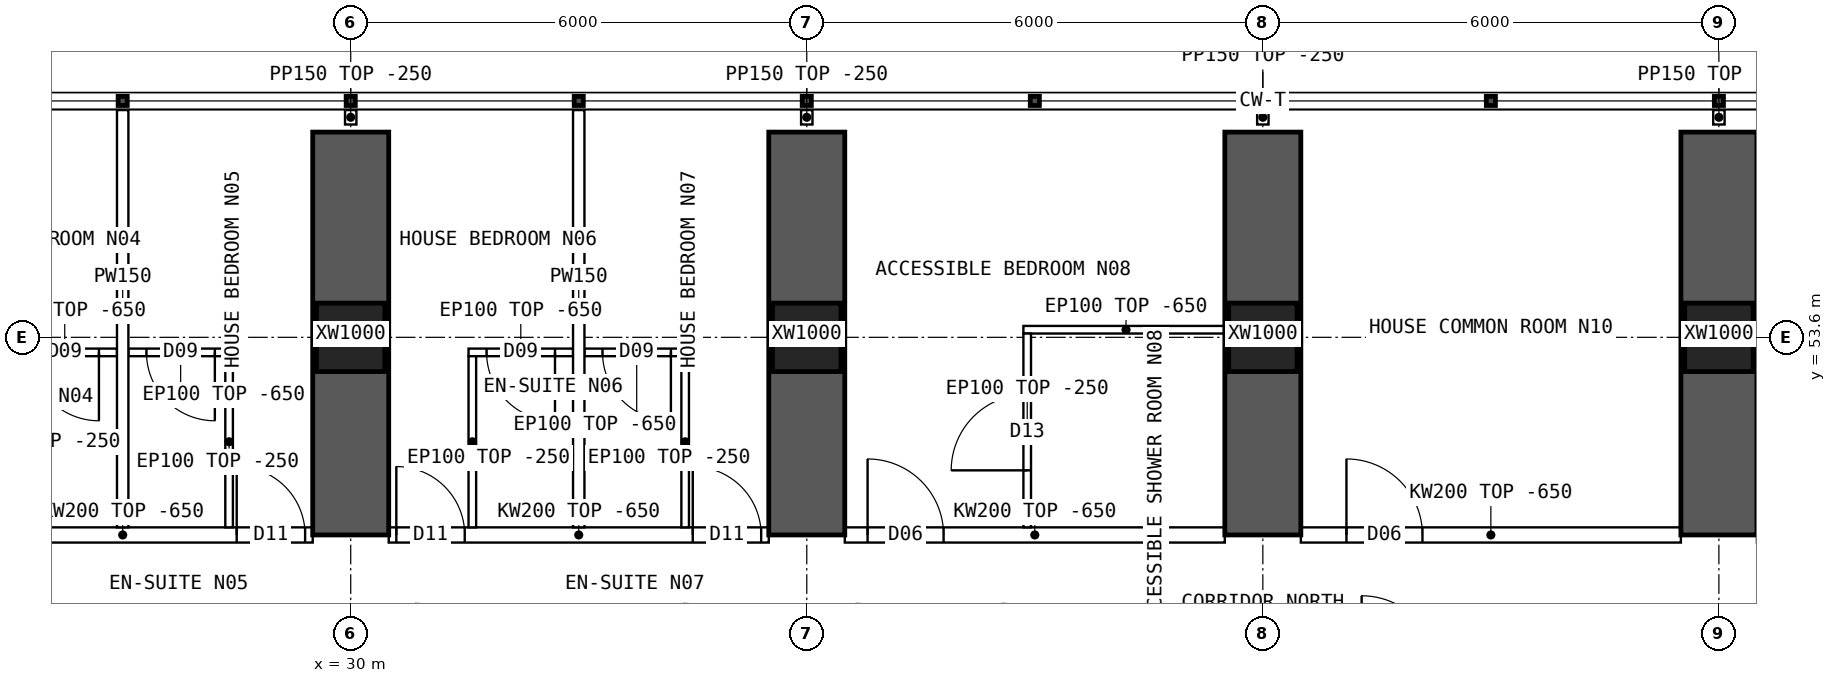
"""IFC4 building model, lengths in metres.
Left out: names, types, materials, properties, quantities, classifications, styles, units other than length and angle.
Written with IfcOpenShell. Run it as: python <this file> out.ifc"""

import sys

from ifc_helpers import new_model, si_unit, direction, frame, frame_2d, origin, origin_2d, place, context, subcontext, project, spatial, polyline, rectangle, hollow_rectangle, outline, extrude, element, fill, save


model = new_model("IFC4")
c1 = context("Model", 3, precision=1e-05, world=origin(), true_north=direction((0.0, 1.0)))
c2 = subcontext(c1, "Body", "Model", "MODEL_VIEW")
j1 = project(units=[si_unit("LENGTHUNIT", "METRE"), si_unit("PLANEANGLEUNIT", "RADIAN")], contexts=[c1])
p1 = place(None, origin())
s1 = spatial("IfcSite", under=j1, at=p1, CompositionType="ELEMENT")
p2 = place(p1, origin())
s2 = spatial("IfcBuilding", under=s1, at=p2, CompositionType="ELEMENT")
p3 = place(p2, frame((0.0, 0.0, 38.95)))
s3 = spatial("IfcBuildingStorey", under=s2, at=p3, CompositionType="ELEMENT", Elevation=38.95)
for number, where, z_axis, x_axis in (
    (1, (30.0, 53.6, 0.0), (0.0, 0.0, 1.0), (1.0, 0.0, 0.0)),
    (2, (36.0, 53.6, 0.0), (0.0, 0.0, 1.0), (1.0, 0.0, 0.0)),
    (3, (42.0, 53.6, 0.0), (0.0, 0.0, 1.0), (1.0, 0.0, 0.0)),
    (4, (48.0, 53.6, 0.0), (0.0, 0.0, 1.0), (1.0, 0.0, 0.0)),
):
    element("IfcColumn", number, at=place(p3, frame(where, z_axis=z_axis, x_axis=x_axis)), inside=s3, PredefinedType="COLUMN", context=c2, shape_type="SweptSolid", body=[
        extrude(hollow_rectangle(XDim=0.9, YDim=0.9, WallThickness=0.09, at=origin_2d()), origin(), (0.0, 0.0, 1.0), 3.75),
    ])
for number, where, z_axis, x_axis in (
    (5, (30.0, 51.0, 0.0), (0.0, 0.0, 1.0), (0.0, 1.0, 0.0)),
    (6, (36.0, 51.0, 0.0), (0.0, 0.0, 1.0), (0.0, 1.0, 0.0)),
    (7, (42.0, 51.0, 0.0), (0.0, 0.0, 1.0), (0.0, 1.0, 0.0)),
    (8, (48.0, 51.0, 0.0), (0.0, 0.0, 1.0), (0.0, 1.0, 0.0)),
):
    element("IfcWall", number, at=place(p3, frame(where, z_axis=z_axis, x_axis=x_axis)), inside=s3, PredefinedType="SHEAR", context=c2, shape_type="SweptSolid", body=[
        extrude(rectangle(XDim=5.3, YDim=1.0, at=frame_2d((2.65, 0.0))), origin(), (0.0, 0.0, 1.0), 3.75),
    ])
p4 = place(p3, frame((24.5, 51.0, 0.0), z_axis=(0.0, 0.0, 1.0), x_axis=(1.0, 0.0, 0.0)))
e9 = element("IfcWall", 9, at=p4, inside=s3, PredefinedType="SOLIDWALL", context=c2, shape_type="SweptSolid", body=[
    extrude(outline(polyline([(0.0, 0.0), (5.0, 0.0), (5.0, 3.1), (0.0, 3.1), (0.0, 0.0)])), frame((0.0, 0.1, 0.0), z_axis=(0.0, -1.0, 0.0), x_axis=(1.0, 0.0, 0.0)), (0.0, 0.0, 1.0), 0.2),
])
p5 = place(p4, frame((0.1, 0.0, 0.0)))
e10 = element("IfcOpeningElement", 10, at=p5, cuts=e9, PredefinedType="OPENING", context=c2, shape_type="SweptSolid", body=[
    extrude(rectangle(XDim=0.9, YDim=2.1, at=frame_2d((0.45, 1.05))), frame((0.0, 0.11, 0.0), z_axis=(0.0, -1.0, 0.0), x_axis=(1.0, 0.0, 0.0)), (0.0, 0.0, 1.0), 0.22),
])
p6 = place(p4, frame((4.0, 0.0, 0.0)))
e11 = element("IfcOpeningElement", 11, at=p6, cuts=e9, PredefinedType="OPENING", context=c2, shape_type="SweptSolid", body=[
    extrude(rectangle(XDim=0.9, YDim=2.1, at=frame_2d((0.45, 1.05))), frame((0.0, 0.11, 0.0), z_axis=(0.0, -1.0, 0.0), x_axis=(1.0, 0.0, 0.0)), (0.0, 0.0, 1.0), 0.22),
])
p7 = place(p3, frame((30.5, 51.0, 0.0), z_axis=(0.0, 0.0, 1.0), x_axis=(1.0, 0.0, 0.0)))
e12 = element("IfcWall", 12, at=p7, inside=s3, PredefinedType="SOLIDWALL", context=c2, shape_type="SweptSolid", body=[
    extrude(outline(polyline([(0.0, 0.0), (5.0, 0.0), (5.0, 3.1), (0.0, 3.1), (0.0, 0.0)])), frame((0.0, 0.1, 0.0), z_axis=(0.0, -1.0, 0.0), x_axis=(1.0, 0.0, 0.0)), (0.0, 0.0, 1.0), 0.2),
])
p8 = place(p7, frame((0.1, 0.0, 0.0)))
e13 = element("IfcOpeningElement", 13, at=p8, cuts=e12, PredefinedType="OPENING", context=c2, shape_type="SweptSolid", body=[
    extrude(rectangle(XDim=0.9, YDim=2.1, at=frame_2d((0.45, 1.05))), frame((0.0, 0.11, 0.0), z_axis=(0.0, -1.0, 0.0), x_axis=(1.0, 0.0, 0.0)), (0.0, 0.0, 1.0), 0.22),
])
p9 = place(p7, frame((4.0, 0.0, 0.0)))
e14 = element("IfcOpeningElement", 14, at=p9, cuts=e12, PredefinedType="OPENING", context=c2, shape_type="SweptSolid", body=[
    extrude(rectangle(XDim=0.9, YDim=2.1, at=frame_2d((0.45, 1.05))), frame((0.0, 0.11, 0.0), z_axis=(0.0, -1.0, 0.0), x_axis=(1.0, 0.0, 0.0)), (0.0, 0.0, 1.0), 0.22),
])
p10 = place(p3, frame((36.5, 51.0, 0.0), z_axis=(0.0, 0.0, 1.0), x_axis=(1.0, 0.0, 0.0)))
e15 = element("IfcWall", 15, at=p10, inside=s3, PredefinedType="SOLIDWALL", context=c2, shape_type="SweptSolid", body=[
    extrude(outline(polyline([(0.0, 0.0), (5.0, 0.0), (5.0, 3.1), (0.0, 3.1), (0.0, 0.0)])), frame((0.0, 0.1, 0.0), z_axis=(0.0, -1.0, 0.0), x_axis=(1.0, 0.0, 0.0)), (0.0, 0.0, 1.0), 0.2),
])
p11 = place(p10, frame((0.3, 0.0, 0.0)))
e16 = element("IfcOpeningElement", 16, at=p11, cuts=e15, PredefinedType="OPENING", context=c2, shape_type="SweptSolid", body=[
    extrude(rectangle(XDim=1.0, YDim=2.1, at=frame_2d((0.5, 1.05))), frame((0.0, 0.11, 0.0), z_axis=(0.0, -1.0, 0.0), x_axis=(1.0, 0.0, 0.0)), (0.0, 0.0, 1.0), 0.22),
])
p12 = place(p3, frame((42.5, 51.0, 0.0), z_axis=(0.0, 0.0, 1.0), x_axis=(1.0, 0.0, 0.0)))
e17 = element("IfcWall", 17, at=p12, inside=s3, PredefinedType="SOLIDWALL", context=c2, shape_type="SweptSolid", body=[
    extrude(outline(polyline([(0.0, 0.0), (5.0, 0.0), (5.0, 3.1), (0.0, 3.1), (0.0, 0.0)])), frame((0.0, 0.1, 0.0), z_axis=(0.0, -1.0, 0.0), x_axis=(1.0, 0.0, 0.0)), (0.0, 0.0, 1.0), 0.2),
])
p13 = place(p12, frame((0.6, 0.0, 0.0)))
e18 = element("IfcOpeningElement", 18, at=p13, cuts=e17, PredefinedType="OPENING", context=c2, shape_type="SweptSolid", body=[
    extrude(rectangle(XDim=1.0, YDim=2.1, at=frame_2d((0.5, 1.05))), frame((0.0, 0.11, 0.0), z_axis=(0.0, -1.0, 0.0), x_axis=(1.0, 0.0, 0.0)), (0.0, 0.0, 1.0), 0.22),
])
p14 = place(p3, frame((27.0, 56.59, 0.0), z_axis=(0.0, 0.0, 1.0), x_axis=(0.0, -1.0, 0.0)))
e19 = element("IfcWall", 19, at=p14, inside=s3, PredefinedType="PARTITIONING", context=c2, shape_type="SweptSolid", body=[
    extrude(outline(polyline([(0.0, 0.0), (5.49, 0.0), (5.49, 3.1), (5.442, 3.1), (5.44, 3.5), (3.192, 3.5), (3.19, 3.1), (2.792, 3.1), (2.79, 3.5), (0.0, 3.5), (0.0, 0.0)])), frame((0.0, 0.075, 0.0), z_axis=(0.0, -1.0, 0.0), x_axis=(1.0, 0.0, 0.0)), (0.0, 0.0, 1.0), 0.15),
])
p15 = place(p3, frame((25.55, 53.402, 0.0), z_axis=(0.0, 0.0, 1.0), x_axis=(1.0, 0.0, 0.0)))
e20 = element("IfcWall", 20, at=p15, inside=s3, PredefinedType="PARTITIONING", context=c2, shape_type="SweptSolid", body=[
    extrude(outline(polyline([(0.0, 0.0), (1.375, 0.0), (1.375, 3.1), (0.0, 3.1), (0.0, 0.0)])), frame((0.0, 0.05, 0.0), z_axis=(0.0, -1.0, 0.0), x_axis=(1.0, 0.0, 0.0)), (0.0, 0.0, 1.0), 0.1),
])
p16 = place(p15, frame((0.238, 0.0, 0.0)))
e21 = element("IfcOpeningElement", 21, at=p16, cuts=e20, PredefinedType="OPENING", context=c2, shape_type="SweptSolid", body=[
    extrude(rectangle(XDim=0.9, YDim=2.1, at=frame_2d((0.45, 1.05))), frame((0.0, 0.06, 0.0), z_axis=(0.0, -1.0, 0.0), x_axis=(1.0, 0.0, 0.0)), (0.0, 0.0, 1.0), 0.12),
])
p17 = place(p3, frame((27.075, 53.402, 0.0), z_axis=(0.0, 0.0, 1.0), x_axis=(1.0, 0.0, 0.0)))
e22 = element("IfcWall", 22, at=p17, inside=s3, PredefinedType="PARTITIONING", context=c2, shape_type="SweptSolid", body=[
    extrude(outline(polyline([(0.0, 0.0), (1.375, 0.0), (1.375, 3.1), (0.0, 3.1), (0.0, 0.0)])), frame((0.0, 0.05, 0.0), z_axis=(0.0, -1.0, 0.0), x_axis=(1.0, 0.0, 0.0)), (0.0, 0.0, 1.0), 0.1),
])
p18 = place(p17, frame((0.238, 0.0, 0.0)))
e23 = element("IfcOpeningElement", 23, at=p18, cuts=e22, PredefinedType="OPENING", context=c2, shape_type="SweptSolid", body=[
    extrude(rectangle(XDim=0.9, YDim=2.1, at=frame_2d((0.45, 1.05))), frame((0.0, 0.06, 0.0), z_axis=(0.0, -1.0, 0.0), x_axis=(1.0, 0.0, 0.0)), (0.0, 0.0, 1.0), 0.12),
])
p19 = place(p3, frame((28.4, 53.352, 0.0), z_axis=(0.0, 0.0, 1.0), x_axis=(0.0, -1.0, 0.0)))
e24 = element("IfcWall", 24, at=p19, inside=s3, PredefinedType="PARTITIONING", context=c2, shape_type="SweptSolid", body=[
    extrude(outline(polyline([(0.0, 0.0), (2.252, 0.0), (2.252, 3.1), (2.204, 3.1), (2.202, 3.5), (0.0, 3.5), (0.0, 0.0)])), frame((0.0, 0.05, 0.0), z_axis=(0.0, -1.0, 0.0), x_axis=(1.0, 0.0, 0.0)), (0.0, 0.0, 1.0), 0.1),
])
p20 = place(p3, frame((33.0, 56.59, 0.0), z_axis=(0.0, 0.0, 1.0), x_axis=(0.0, -1.0, 0.0)))
e25 = element("IfcWall", 25, at=p20, inside=s3, PredefinedType="PARTITIONING", context=c2, shape_type="SweptSolid", body=[
    extrude(outline(polyline([(0.0, 0.0), (5.49, 0.0), (5.49, 3.1), (5.442, 3.1), (5.44, 3.5), (3.192, 3.5), (3.19, 3.1), (2.792, 3.1), (2.79, 3.5), (0.0, 3.5), (0.0, 0.0)])), frame((0.0, 0.075, 0.0), z_axis=(0.0, -1.0, 0.0), x_axis=(1.0, 0.0, 0.0)), (0.0, 0.0, 1.0), 0.15),
])
p21 = place(p3, frame((31.55, 53.402, 0.0), z_axis=(0.0, 0.0, 1.0), x_axis=(1.0, 0.0, 0.0)))
e26 = element("IfcWall", 26, at=p21, inside=s3, PredefinedType="PARTITIONING", context=c2, shape_type="SweptSolid", body=[
    extrude(outline(polyline([(0.0, 0.0), (1.375, 0.0), (1.375, 3.1), (0.0, 3.1), (0.0, 0.0)])), frame((0.0, 0.05, 0.0), z_axis=(0.0, -1.0, 0.0), x_axis=(1.0, 0.0, 0.0)), (0.0, 0.0, 1.0), 0.1),
])
p22 = place(p21, frame((0.238, 0.0, 0.0)))
e27 = element("IfcOpeningElement", 27, at=p22, cuts=e26, PredefinedType="OPENING", context=c2, shape_type="SweptSolid", body=[
    extrude(rectangle(XDim=0.9, YDim=2.1, at=frame_2d((0.45, 1.05))), frame((0.0, 0.06, 0.0), z_axis=(0.0, -1.0, 0.0), x_axis=(1.0, 0.0, 0.0)), (0.0, 0.0, 1.0), 0.12),
])
p23 = place(p3, frame((31.6, 53.352, 0.0), z_axis=(0.0, 0.0, 1.0), x_axis=(0.0, -1.0, 0.0)))
e28 = element("IfcWall", 28, at=p23, inside=s3, PredefinedType="PARTITIONING", context=c2, shape_type="SweptSolid", body=[
    extrude(outline(polyline([(0.0, 0.0), (2.252, 0.0), (2.252, 3.1), (2.204, 3.1), (2.202, 3.5), (0.0, 3.5), (0.0, 0.0)])), frame((0.0, 0.05, 0.0), z_axis=(0.0, -1.0, 0.0), x_axis=(1.0, 0.0, 0.0)), (0.0, 0.0, 1.0), 0.1),
])
p24 = place(p3, frame((33.075, 53.402, 0.0), z_axis=(0.0, 0.0, 1.0), x_axis=(1.0, 0.0, 0.0)))
e29 = element("IfcWall", 29, at=p24, inside=s3, PredefinedType="PARTITIONING", context=c2, shape_type="SweptSolid", body=[
    extrude(outline(polyline([(0.0, 0.0), (1.375, 0.0), (1.375, 3.1), (0.0, 3.1), (0.0, 0.0)])), frame((0.0, 0.05, 0.0), z_axis=(0.0, -1.0, 0.0), x_axis=(1.0, 0.0, 0.0)), (0.0, 0.0, 1.0), 0.1),
])
p25 = place(p24, frame((0.238, 0.0, 0.0)))
e30 = element("IfcOpeningElement", 30, at=p25, cuts=e29, PredefinedType="OPENING", context=c2, shape_type="SweptSolid", body=[
    extrude(rectangle(XDim=0.9, YDim=2.1, at=frame_2d((0.45, 1.05))), frame((0.0, 0.06, 0.0), z_axis=(0.0, -1.0, 0.0), x_axis=(1.0, 0.0, 0.0)), (0.0, 0.0, 1.0), 0.12),
])
p26 = place(p3, frame((34.4, 53.352, 0.0), z_axis=(0.0, 0.0, 1.0), x_axis=(0.0, -1.0, 0.0)))
e31 = element("IfcWall", 31, at=p26, inside=s3, PredefinedType="PARTITIONING", context=c2, shape_type="SweptSolid", body=[
    extrude(outline(polyline([(0.0, 0.0), (2.252, 0.0), (2.252, 3.1), (2.204, 3.1), (2.202, 3.5), (0.0, 3.5), (0.0, 0.0)])), frame((0.0, 0.05, 0.0), z_axis=(0.0, -1.0, 0.0), x_axis=(1.0, 0.0, 0.0)), (0.0, 0.0, 1.0), 0.1),
])
p27 = place(p3, frame((38.85, 53.7, 0.0), z_axis=(0.0, 0.0, 1.0), x_axis=(1.0, 0.0, 0.0)))
e32 = element("IfcWall", 32, at=p27, inside=s3, PredefinedType="PARTITIONING", context=c2, shape_type="SweptSolid", body=[
    extrude(outline(polyline([(0.0, 0.0), (2.7, 0.0), (2.7, 3.1), (0.0, 3.1), (0.0, 0.0)])), frame((0.0, 0.05, 0.0), z_axis=(0.0, -1.0, 0.0), x_axis=(1.0, 0.0, 0.0)), (0.0, 0.0, 1.0), 0.1),
])
p28 = place(p3, frame((38.9, 53.65, 0.0), z_axis=(0.0, 0.0, 1.0), x_axis=(0.0, -1.0, 0.0)))
e33 = element("IfcWall", 33, at=p28, inside=s3, PredefinedType="PARTITIONING", context=c2, shape_type="SweptSolid", body=[
    extrude(outline(polyline([(0.0, 0.0), (2.55, 0.0), (2.55, 3.1), (2.502, 3.1), (2.5, 3.5), (0.252, 3.5), (0.25, 3.1), (0.0, 3.1), (0.0, 0.0)])), frame((0.0, 0.05, 0.0), z_axis=(0.0, -1.0, 0.0), x_axis=(1.0, 0.0, 0.0)), (0.0, 0.0, 1.0), 0.1),
])
p29 = place(p28, frame((0.8, 0.0, 0.0)))
e34 = element("IfcOpeningElement", 34, at=p29, cuts=e33, PredefinedType="OPENING", context=c2, shape_type="SweptSolid", body=[
    extrude(rectangle(XDim=1.0, YDim=2.1, at=frame_2d((0.5, 1.05))), frame((0.0, 0.06, 0.0), z_axis=(0.0, -1.0, 0.0), x_axis=(1.0, 0.0, 0.0)), (0.0, 0.0, 1.0), 0.12),
])
for number, where, z_axis, x_axis in (
    (35, (30.0, 56.4, 0.0), (0.0, 0.0, 1.0), (0.0, 1.0, 0.0)),
    (36, (36.0, 56.4, 0.0), (0.0, 0.0, 1.0), (0.0, 1.0, 0.0)),
    (37, (42.0, 56.4, 0.0), (0.0, 0.0, 1.0), (0.0, 1.0, 0.0)),
    (38, (48.0, 56.4, 0.0), (0.0, 0.0, 1.0), (0.0, 1.0, 0.0)),
):
    element("IfcWall", number, at=place(p3, frame(where, z_axis=z_axis, x_axis=x_axis)), inside=s3, PredefinedType="PARTITIONING", context=c2, shape_type="SweptSolid", body=[
        extrude(rectangle(XDim=0.19, YDim=0.15, at=frame_2d((0.095, 0.0))), origin(), (0.0, 0.0, 1.0), 3.5),
    ])
p30 = place(p16, origin())
e39 = element("IfcDoor", 39, at=p30, inside=s3, OperationType="SINGLE_SWING_RIGHT", PredefinedType="DOOR", context=c2, shape_type="SweptSolid", body=[
    extrude(rectangle(XDim=0.9, YDim=2.1, at=frame_2d((0.45, 1.05))), frame((0.0, 0.025, 0.0), z_axis=(0.0, -1.0, 0.0), x_axis=(1.0, 0.0, 0.0)), (0.0, 0.0, 1.0), 0.05),
])
fill(e21, e39)
p31 = place(p18, origin())
e40 = element("IfcDoor", 40, at=p31, inside=s3, OperationType="SINGLE_SWING_RIGHT", PredefinedType="DOOR", context=c2, shape_type="SweptSolid", body=[
    extrude(rectangle(XDim=0.9, YDim=2.1, at=frame_2d((0.45, 1.05))), frame((0.0, 0.025, 0.0), z_axis=(0.0, -1.0, 0.0), x_axis=(1.0, 0.0, 0.0)), (0.0, 0.0, 1.0), 0.05),
])
fill(e23, e40)
p32 = place(p6, origin())
e41 = element("IfcDoor", 41, at=p32, inside=s3, OperationType="SINGLE_SWING_LEFT", PredefinedType="DOOR", context=c2, shape_type="SweptSolid", body=[
    extrude(rectangle(XDim=0.9, YDim=2.1, at=frame_2d((0.45, 1.05))), frame((0.0, 0.025, 0.0), z_axis=(0.0, -1.0, 0.0), x_axis=(1.0, 0.0, 0.0)), (0.0, 0.0, 1.0), 0.05),
])
fill(e11, e41)
p33 = place(p22, origin())
e42 = element("IfcDoor", 42, at=p33, inside=s3, OperationType="SINGLE_SWING_RIGHT", PredefinedType="DOOR", context=c2, shape_type="SweptSolid", body=[
    extrude(rectangle(XDim=0.9, YDim=2.1, at=frame_2d((0.45, 1.05))), frame((0.0, 0.025, 0.0), z_axis=(0.0, -1.0, 0.0), x_axis=(1.0, 0.0, 0.0)), (0.0, 0.0, 1.0), 0.05),
])
fill(e27, e42)
p34 = place(p8, origin())
e43 = element("IfcDoor", 43, at=p34, inside=s3, OperationType="SINGLE_SWING_LEFT", PredefinedType="DOOR", context=c2, shape_type="SweptSolid", body=[
    extrude(rectangle(XDim=0.9, YDim=2.1, at=frame_2d((0.45, 1.05))), frame((0.0, 0.025, 0.0), z_axis=(0.0, -1.0, 0.0), x_axis=(1.0, 0.0, 0.0)), (0.0, 0.0, 1.0), 0.05),
])
fill(e13, e43)
p35 = place(p25, origin())
e44 = element("IfcDoor", 44, at=p35, inside=s3, OperationType="SINGLE_SWING_RIGHT", PredefinedType="DOOR", context=c2, shape_type="SweptSolid", body=[
    extrude(rectangle(XDim=0.9, YDim=2.1, at=frame_2d((0.45, 1.05))), frame((0.0, 0.025, 0.0), z_axis=(0.0, -1.0, 0.0), x_axis=(1.0, 0.0, 0.0)), (0.0, 0.0, 1.0), 0.05),
])
fill(e30, e44)
p36 = place(p9, origin())
e45 = element("IfcDoor", 45, at=p36, inside=s3, OperationType="SINGLE_SWING_LEFT", PredefinedType="DOOR", context=c2, shape_type="SweptSolid", body=[
    extrude(rectangle(XDim=0.9, YDim=2.1, at=frame_2d((0.45, 1.05))), frame((0.0, 0.025, 0.0), z_axis=(0.0, -1.0, 0.0), x_axis=(1.0, 0.0, 0.0)), (0.0, 0.0, 1.0), 0.05),
])
fill(e14, e45)
p37 = place(p29, origin())
e46 = element("IfcDoor", 46, at=p37, inside=s3, OperationType="SINGLE_SWING_RIGHT", PredefinedType="DOOR", context=c2, shape_type="SweptSolid", body=[
    extrude(rectangle(XDim=1.0, YDim=2.1, at=frame_2d((0.5, 1.05))), frame((0.0, 0.025, 0.0), z_axis=(0.0, -1.0, 0.0), x_axis=(1.0, 0.0, 0.0)), (0.0, 0.0, 1.0), 0.05),
])
fill(e34, e46)
p38 = place(p11, origin())
e47 = element("IfcDoor", 47, at=p38, inside=s3, OperationType="SINGLE_SWING_LEFT", PredefinedType="DOOR", context=c2, shape_type="SweptSolid", body=[
    extrude(rectangle(XDim=1.0, YDim=2.1, at=frame_2d((0.5, 1.05))), frame((0.0, 0.025, 0.0), z_axis=(0.0, -1.0, 0.0), x_axis=(1.0, 0.0, 0.0)), (0.0, 0.0, 1.0), 0.05),
])
fill(e16, e47)
p39 = place(p13, origin())
e48 = element("IfcDoor", 48, at=p39, inside=s3, OperationType="SINGLE_SWING_LEFT", PredefinedType="DOOR", context=c2, shape_type="SweptSolid", body=[
    extrude(rectangle(XDim=1.0, YDim=2.1, at=frame_2d((0.5, 1.05))), frame((0.0, 0.025, 0.0), z_axis=(0.0, -1.0, 0.0), x_axis=(1.0, 0.0, 0.0)), (0.0, 0.0, 1.0), 0.05),
])
fill(e18, e48)
save(model, sys.argv[1])
